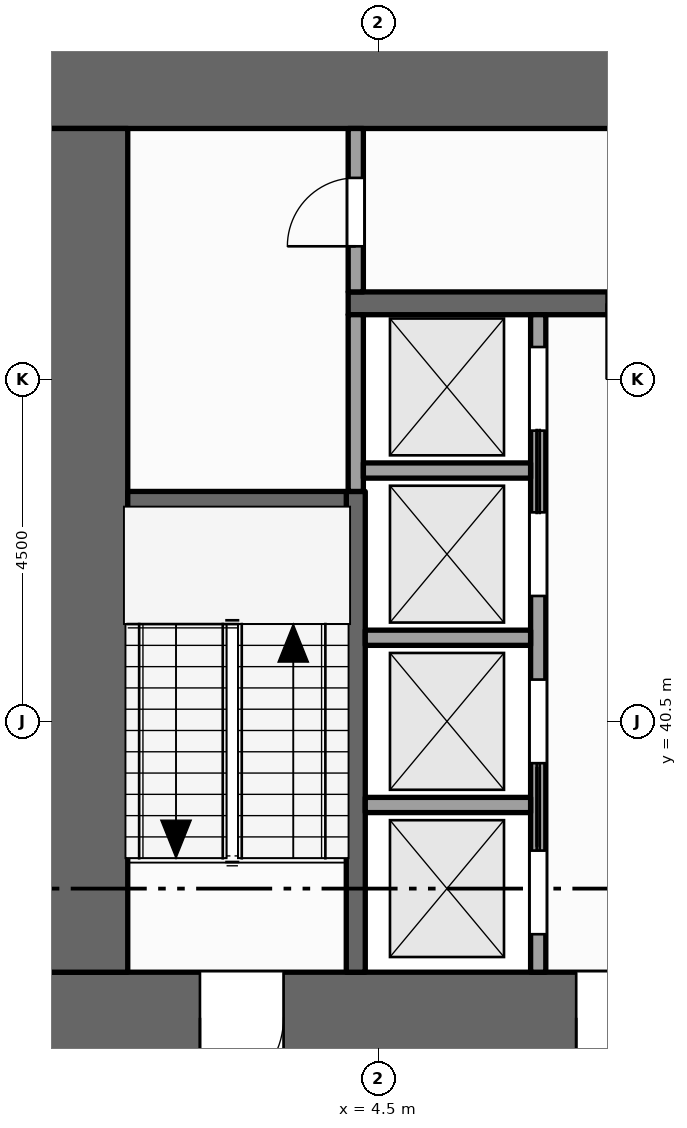
"""IFC4 building model, lengths in metres.
Left out: names, types, materials, properties, quantities, classifications, styles, units other than length and angle.
Written with IfcOpenShell. Run it as: python <this file> out.ifc"""

import sys

from ifc_helpers import new_model, si_unit, direction, frame, frame_2d, origin, place, context, subcontext, project, spatial, rectangle, extrude, element, fill, save


model = new_model("IFC4")
c1 = context("Model", 3, precision=1e-05, world=origin(), true_north=direction((0.0, 1.0)))
c2 = subcontext(c1, "Body", "Model", "MODEL_VIEW")
j1 = project(units=[si_unit("LENGTHUNIT", "METRE"), si_unit("PLANEANGLEUNIT", "RADIAN")], contexts=[c1])
p1 = place(None, origin())
s1 = spatial("IfcSite", under=j1, at=p1, CompositionType="ELEMENT")
p2 = place(p1, origin())
s2 = spatial("IfcBuilding", under=s1, at=p2, CompositionType="ELEMENT")
p3 = place(p2, frame((0.0, 0.0, 83.0)))
s3 = spatial("IfcBuildingStorey", under=s2, at=p3, CompositionType="ELEMENT", Elevation=83.0)
p4 = place(p3, frame((0.0, 36.6, -0.15), z_axis=(0.0, 0.0, 1.0), x_axis=(1.0, 0.0, 0.0)))
e1 = element("IfcWall", 1, at=p4, inside=s3, PredefinedType="SHEAR", context=c2, shape_type="SweptSolid", body=[
    extrude(rectangle(XDim=22.5, YDim=1.2, at=frame_2d((11.25, 0.0))), origin(), (0.0, 0.0, 1.0), 4.0),
])
p5 = place(p4, frame((7.1, 0.0, 0.15)))
e2 = element("IfcOpeningElement", 2, at=p5, cuts=e1, PredefinedType="OPENING", context=c2, shape_type="SweptSolid", body=[
    extrude(rectangle(XDim=1.8, YDim=2.1, at=frame_2d((0.9, 1.05))), frame((0.0, 0.61, 0.0), z_axis=(0.0, -1.0, 0.0), x_axis=(1.0, 0.0, 0.0)), (0.0, 0.0, 1.0), 1.22),
])
p6 = place(p4, frame((13.15, 0.0, 0.15)))
e3 = element("IfcOpeningElement", 3, at=p6, cuts=e1, PredefinedType="OPENING", context=c2, shape_type="SweptSolid", body=[
    extrude(rectangle(XDim=1.1, YDim=2.1, at=frame_2d((0.55, 1.05))), frame((0.0, 0.61, 0.0), z_axis=(0.0, -1.0, 0.0), x_axis=(1.0, 0.0, 0.0)), (0.0, 0.0, 1.0), 1.22),
])
p7 = place(p4, frame((2.15, 0.0, 0.15)))
e4 = element("IfcOpeningElement", 4, at=p7, cuts=e1, PredefinedType="OPENING", context=c2, shape_type="SweptSolid", body=[
    extrude(rectangle(XDim=1.1, YDim=2.1, at=frame_2d((0.55, 1.05))), frame((0.0, 0.61, 0.0), z_axis=(0.0, -1.0, 0.0), x_axis=(1.0, 0.0, 0.0)), (0.0, 0.0, 1.0), 1.22),
])
p8 = place(p4, frame((19.35, 0.0, 0.15)))
e5 = element("IfcOpeningElement", 5, at=p8, cuts=e1, PredefinedType="OPENING", context=c2, shape_type="SweptSolid", body=[
    extrude(rectangle(XDim=1.1, YDim=2.1, at=frame_2d((0.55, 1.05))), frame((0.0, 0.61, 0.0), z_axis=(0.0, -1.0, 0.0), x_axis=(1.0, 0.0, 0.0)), (0.0, 0.0, 1.0), 1.22),
])
p9 = place(p3, frame((0.0, 48.9, -0.15), z_axis=(0.0, 0.0, 1.0), x_axis=(1.0, 0.0, 0.0)))
e6 = element("IfcWall", 6, at=p9, inside=s3, PredefinedType="SHEAR", context=c2, shape_type="SweptSolid", body=[
    extrude(rectangle(XDim=22.5, YDim=1.2, at=frame_2d((11.25, 0.0))), origin(), (0.0, 0.0, 1.0), 4.0),
])
p10 = place(p3, frame((0.6, 37.2, -0.15), z_axis=(0.0, 0.0, 1.0), x_axis=(0.0, 1.0, 0.0)))
e7 = element("IfcWall", 7, at=p10, inside=s3, PredefinedType="SHEAR", context=c2, shape_type="SweptSolid", body=[
    extrude(rectangle(XDim=11.1, YDim=1.2, at=frame_2d((5.55, 0.0))), origin(), (0.0, 0.0, 1.0), 4.0),
])
p11 = place(p3, frame((4.2, 37.2, 0.0), z_axis=(0.0, 0.0, 1.0), x_axis=(0.0, 1.0, 0.0)))
e8 = element("IfcWall", 8, at=p11, inside=s3, PredefinedType="SHEAR", context=c2, shape_type="SweptSolid", body=[
    extrude(rectangle(XDim=6.325, YDim=0.25, at=frame_2d((3.163, 0.0))), origin(), (0.0, 0.0, 1.0), 3.85),
])
p12 = place(p3, frame((4.2, 43.525, 0.0), z_axis=(0.0, 0.0, 1.0), x_axis=(0.0, 1.0, 0.0)))
e9 = element("IfcWall", 9, at=p12, inside=s3, PredefinedType="SOLIDWALL", context=c2, shape_type="SweptSolid", body=[
    extrude(rectangle(XDim=2.325, YDim=0.2, at=frame_2d((1.163, 0.0))), origin(), (0.0, 0.0, 1.0), 3.85),
])
p13 = place(p3, frame((4.2, 46.15, 0.0), z_axis=(0.0, 0.0, 1.0), x_axis=(0.0, 1.0, 0.0)))
e10 = element("IfcWall", 10, at=p13, inside=s3, PredefinedType="PARTITIONING", context=c2, shape_type="SweptSolid", body=[
    extrude(rectangle(XDim=2.15, YDim=0.2, at=frame_2d((1.075, 0.0))), origin(), (0.0, 0.0, 1.0), 3.85),
])
p14 = place(p13, frame((0.6, 0.0, 0.0)))
e11 = element("IfcOpeningElement", 11, at=p14, cuts=e10, PredefinedType="OPENING", context=c2, shape_type="SweptSolid", body=[
    extrude(rectangle(XDim=0.9, YDim=2.1, at=frame_2d((0.45, 1.05))), frame((0.0, 0.11, 0.0), z_axis=(0.0, -1.0, 0.0), x_axis=(1.0, 0.0, 0.0)), (0.0, 0.0, 1.0), 0.22),
])
p15 = place(p3, frame((6.6, 37.2, 0.0), z_axis=(0.0, 0.0, 1.0), x_axis=(0.0, 1.0, 0.0)))
e12 = element("IfcWall", 12, at=p15, inside=s3, PredefinedType="SOLIDWALL", context=c2, shape_type="SweptSolid", body=[
    extrude(rectangle(XDim=8.65, YDim=0.2, at=frame_2d((4.325, 0.0))), origin(), (0.0, 0.0, 1.0), 3.85),
])
p16 = place(p15, frame((0.5, 0.0, 0.012)))
e13 = element("IfcOpeningElement", 13, at=p16, cuts=e12, PredefinedType="OPENING", context=c2, shape_type="SweptSolid", body=[
    extrude(rectangle(XDim=1.1, YDim=2.1, at=frame_2d((0.55, 1.05))), frame((0.0, 0.11, 0.0), z_axis=(0.0, -1.0, 0.0), x_axis=(1.0, 0.0, 0.0)), (0.0, 0.0, 1.0), 0.22),
])
p17 = place(p15, frame((2.75, 0.0, 0.012)))
e14 = element("IfcOpeningElement", 14, at=p17, cuts=e12, PredefinedType="OPENING", context=c2, shape_type="SweptSolid", body=[
    extrude(rectangle(XDim=1.1, YDim=2.1, at=frame_2d((0.55, 1.05))), frame((0.0, 0.11, 0.0), z_axis=(0.0, -1.0, 0.0), x_axis=(1.0, 0.0, 0.0)), (0.0, 0.0, 1.0), 0.22),
])
p18 = place(p15, frame((4.95, 0.0, 0.012)))
e15 = element("IfcOpeningElement", 15, at=p18, cuts=e12, PredefinedType="OPENING", context=c2, shape_type="SweptSolid", body=[
    extrude(rectangle(XDim=1.1, YDim=2.1, at=frame_2d((0.55, 1.05))), frame((0.0, 0.11, 0.0), z_axis=(0.0, -1.0, 0.0), x_axis=(1.0, 0.0, 0.0)), (0.0, 0.0, 1.0), 0.22),
])
p19 = place(p15, frame((7.125, 0.0, 0.012)))
e16 = element("IfcOpeningElement", 16, at=p19, cuts=e12, PredefinedType="OPENING", context=c2, shape_type="SweptSolid", body=[
    extrude(rectangle(XDim=1.1, YDim=2.1, at=frame_2d((0.55, 1.05))), frame((0.0, 0.11, 0.0), z_axis=(0.0, -1.0, 0.0), x_axis=(1.0, 0.0, 0.0)), (0.0, 0.0, 1.0), 0.22),
])
for number, where, z_axis, x_axis in (
    (17, (4.325, 39.4, 0.0), (0.0, 0.0, 1.0), (1.0, 0.0, 0.0)),
    (18, (4.325, 41.6, 0.0), (0.0, 0.0, 1.0), (1.0, 0.0, 0.0)),
):
    element("IfcWall", number, at=place(p3, frame(where, z_axis=z_axis, x_axis=x_axis)), inside=s3, PredefinedType="SOLIDWALL", context=c2, shape_type="SweptSolid", body=[
        extrude(rectangle(XDim=2.175, YDim=0.2, at=frame_2d((1.087, 0.0))), origin(), (0.0, 0.0, 1.0), 3.85),
    ])
p20 = place(p3, frame((1.2, 43.4, 0.0), z_axis=(0.0, 0.0, 1.0), x_axis=(1.0, 0.0, 0.0)))
e19 = element("IfcWall", 19, at=p20, inside=s3, PredefinedType="SHEAR", context=c2, shape_type="SweptSolid", body=[
    extrude(rectangle(XDim=2.875, YDim=0.25, at=frame_2d((1.438, 0.0))), origin(), (0.0, 0.0, 1.0), 3.85),
])
p21 = place(p3, frame((4.3, 43.8, 0.0), z_axis=(0.0, 0.0, 1.0), x_axis=(1.0, 0.0, 0.0)))
e20 = element("IfcWall", 20, at=p21, inside=s3, PredefinedType="SOLIDWALL", context=c2, shape_type="SweptSolid", body=[
    extrude(rectangle(XDim=2.2, YDim=0.2, at=frame_2d((1.1, 0.0))), origin(), (0.0, 0.0, 1.0), 3.85),
])
p22 = place(p3, frame((4.1, 46.0, 0.0), z_axis=(0.0, 0.0, 1.0), x_axis=(1.0, 0.0, 0.0)))
e21 = element("IfcWall", 21, at=p22, inside=s3, PredefinedType="SHEAR", context=c2, shape_type="SweptSolid", body=[
    extrude(rectangle(XDim=14.5, YDim=0.3, at=frame_2d((7.25, 0.0))), origin(), (0.0, 0.0, 1.0), 3.85),
])
p23 = place(p22, frame((3.4, 0.0, 0.0)))
e22 = element("IfcOpeningElement", 22, at=p23, cuts=e21, PredefinedType="OPENING", context=c2, shape_type="SweptSolid", body=[
    extrude(rectangle(XDim=1.0, YDim=2.1, at=frame_2d((0.5, 1.05))), frame((0.0, 0.16, 0.0), z_axis=(0.0, -1.0, 0.0), x_axis=(1.0, 0.0, 0.0)), (0.0, 0.0, 1.0), 0.32),
])
p24 = place(p22, frame((9.1, 0.0, 0.0)))
e23 = element("IfcOpeningElement", 23, at=p24, cuts=e21, PredefinedType="OPENING", context=c2, shape_type="SweptSolid", body=[
    extrude(rectangle(XDim=1.0, YDim=2.1, at=frame_2d((0.5, 1.05))), frame((0.0, 0.16, 0.0), z_axis=(0.0, -1.0, 0.0), x_axis=(1.0, 0.0, 0.0)), (0.0, 0.0, 1.0), 0.32),
])
p25 = place(p16, origin())
e24 = element("IfcDoor", 24, at=p25, inside=s3, OperationType="SLIDING_TO_RIGHT", PredefinedType="DOOR", context=c2, shape_type="SweptSolid", body=[
    extrude(rectangle(XDim=1.1, YDim=2.1, at=frame_2d((0.55, 1.05))), frame((0.0, 0.025, 0.0), z_axis=(0.0, -1.0, 0.0), x_axis=(1.0, 0.0, 0.0)), (0.0, 0.0, 1.0), 0.05),
])
fill(e13, e24)
p26 = place(p17, origin())
e25 = element("IfcDoor", 25, at=p26, inside=s3, OperationType="SLIDING_TO_LEFT", PredefinedType="DOOR", context=c2, shape_type="SweptSolid", body=[
    extrude(rectangle(XDim=1.1, YDim=2.1, at=frame_2d((0.55, 1.05))), frame((0.0, 0.025, 0.0), z_axis=(0.0, -1.0, 0.0), x_axis=(1.0, 0.0, 0.0)), (0.0, 0.0, 1.0), 0.05),
])
fill(e14, e25)
p27 = place(p18, origin())
e26 = element("IfcDoor", 26, at=p27, inside=s3, OperationType="SLIDING_TO_RIGHT", PredefinedType="DOOR", context=c2, shape_type="SweptSolid", body=[
    extrude(rectangle(XDim=1.1, YDim=2.1, at=frame_2d((0.55, 1.05))), frame((0.0, 0.025, 0.0), z_axis=(0.0, -1.0, 0.0), x_axis=(1.0, 0.0, 0.0)), (0.0, 0.0, 1.0), 0.05),
])
fill(e15, e26)
p28 = place(p19, origin())
e27 = element("IfcDoor", 27, at=p28, inside=s3, OperationType="SLIDING_TO_LEFT", PredefinedType="DOOR", context=c2, shape_type="SweptSolid", body=[
    extrude(rectangle(XDim=1.1, YDim=2.1, at=frame_2d((0.55, 1.05))), frame((0.0, 0.025, 0.0), z_axis=(0.0, -1.0, 0.0), x_axis=(1.0, 0.0, 0.0)), (0.0, 0.0, 1.0), 0.05),
])
fill(e16, e27)
p29 = place(p5, origin())
e28 = element("IfcDoor", 28, at=p29, inside=s3, OperationType="DOUBLE_DOOR_SINGLE_SWING", PredefinedType="DOOR", context=c2, shape_type="SweptSolid", body=[
    extrude(rectangle(XDim=1.8, YDim=2.1, at=frame_2d((0.9, 1.05))), frame((0.0, 0.025, 0.0), z_axis=(0.0, -1.0, 0.0), x_axis=(1.0, 0.0, 0.0)), (0.0, 0.0, 1.0), 0.05),
])
fill(e2, e28)
p30 = place(p7, origin())
e29 = element("IfcDoor", 29, at=p30, inside=s3, OperationType="SINGLE_SWING_LEFT", PredefinedType="DOOR", context=c2, shape_type="SweptSolid", body=[
    extrude(rectangle(XDim=1.1, YDim=2.1, at=frame_2d((0.55, 1.05))), frame((0.0, 0.025, 0.0), z_axis=(0.0, -1.0, 0.0), x_axis=(1.0, 0.0, 0.0)), (0.0, 0.0, 1.0), 0.05),
])
fill(e4, e29)
p31 = place(p14, origin())
e30 = element("IfcDoor", 30, at=p31, inside=s3, OperationType="SINGLE_SWING_LEFT", PredefinedType="DOOR", context=c2, shape_type="SweptSolid", body=[
    extrude(rectangle(XDim=0.9, YDim=2.1, at=frame_2d((0.45, 1.05))), frame((0.0, 0.025, 0.0), z_axis=(0.0, -1.0, 0.0), x_axis=(1.0, 0.0, 0.0)), (0.0, 0.0, 1.0), 0.05),
])
fill(e11, e30)
save(model, sys.argv[1])
